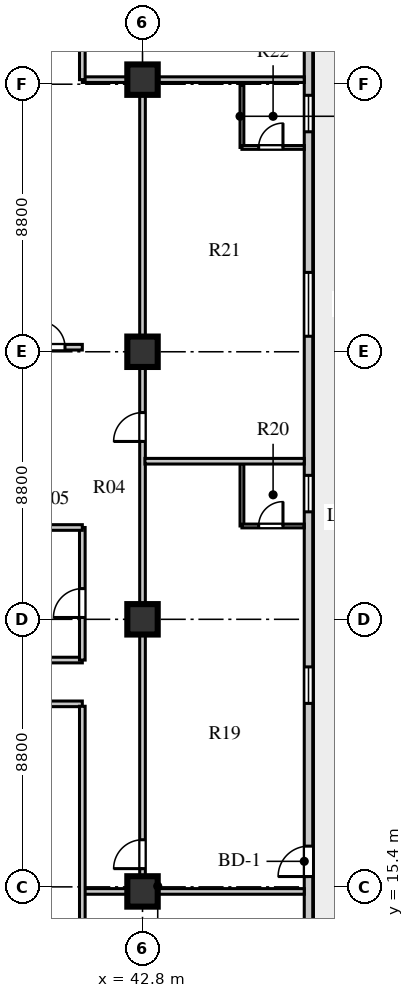
"""IFC4 building model, lengths in metres.
Left out: names, types, materials, properties, quantities, classifications, styles, units other than length and angle.
Written with IfcOpenShell. Run it as: python <this file> out.ifc"""

import sys

from ifc_helpers import new_model, si_unit, direction, frame, frame_2d, origin, origin_2d, place, context, subcontext, project, spatial, rectangle, extrude, element, fill, save


model = new_model("IFC4")
c1 = context("Model", 3, precision=1e-05, world=origin(), true_north=direction((0.0, 1.0)))
c2 = subcontext(c1, "Body", "Model", "MODEL_VIEW")
j1 = project(units=[si_unit("LENGTHUNIT", "METRE"), si_unit("PLANEANGLEUNIT", "RADIAN")], contexts=[c1])
p1 = place(None, origin())
s1 = spatial("IfcSite", under=j1, at=p1, CompositionType="ELEMENT")
p2 = place(p1, origin())
s2 = spatial("IfcBuilding", under=s1, at=p2, CompositionType="ELEMENT")
p3 = place(p2, frame((0.0, 0.0, 150.2)))
s3 = spatial("IfcBuildingStorey", under=s2, at=p3, CompositionType="ELEMENT", Elevation=150.2)
for number, where, z_axis, x_axis in (
    (1, (42.8, 15.25, 0.0), (0.0, 0.0, 1.0), (1.0, 0.0, 0.0)),
    (2, (42.8, 24.2, 0.0), (0.0, 0.0, 1.0), (1.0, 0.0, 0.0)),
    (3, (42.8, 33.0, 0.0), (0.0, 0.0, 1.0), (1.0, 0.0, 0.0)),
    (4, (42.8, 41.95, 0.0), (0.0, 0.0, 1.0), (1.0, 0.0, 0.0)),
):
    element("IfcColumn", number, at=place(p3, frame(where, z_axis=z_axis, x_axis=x_axis)), inside=s3, PredefinedType="COLUMN", context=c2, shape_type="SweptSolid", body=[
        extrude(rectangle(XDim=1.0, YDim=1.0, at=origin_2d()), origin(), (0.0, 0.0, 1.0), 3.55),
    ])
p4 = place(p3, frame((48.26, 13.33, 0.0), z_axis=(0.0, 0.0, 1.0), x_axis=(0.0, 1.0, 0.0)))
e5 = element("IfcWall", 5, at=p4, inside=s3, PredefinedType="STANDARD", context=c2, shape_type="SweptSolid", body=[
    extrude(rectangle(XDim=30.54, YDim=0.28, at=frame_2d((15.27, 0.0))), origin(), (0.0, 0.0, 1.0), 3.55),
])
p5 = place(p4, frame((2.41, 0.0, 0.0)))
e6 = element("IfcOpeningElement", 6, at=p5, cuts=e5, PredefinedType="OPENING", context=c2, shape_type="SweptSolid", body=[
    extrude(rectangle(XDim=1.0, YDim=2.05, at=frame_2d((0.5, 1.025))), frame((0.0, 0.15, 0.0), z_axis=(0.0, -1.0, 0.0), x_axis=(1.0, 0.0, 0.0)), (0.0, 0.0, 1.0), 0.3),
])
p6 = place(p4, frame((8.105, 0.0, 0.8)))
e7 = element("IfcOpeningElement", 7, at=p6, cuts=e5, PredefinedType="OPENING", context=c2, shape_type="SweptSolid", body=[
    extrude(rectangle(XDim=1.2, YDim=1.75, at=frame_2d((0.6, 0.875))), frame((0.0, 0.15, 0.0), z_axis=(0.0, -1.0, 0.0), x_axis=(1.0, 0.0, 0.0)), (0.0, 0.0, 1.0), 0.3),
])
p7 = place(p4, frame((14.405, 0.0, 0.8)))
e8 = element("IfcOpeningElement", 8, at=p7, cuts=e5, PredefinedType="OPENING", context=c2, shape_type="SweptSolid", body=[
    extrude(rectangle(XDim=1.2, YDim=1.75, at=frame_2d((0.6, 0.875))), frame((0.0, 0.15, 0.0), z_axis=(0.0, -1.0, 0.0), x_axis=(1.0, 0.0, 0.0)), (0.0, 0.0, 1.0), 0.3),
])
p8 = place(p4, frame((20.18, 0.0, 0.8)))
e9 = element("IfcOpeningElement", 9, at=p8, cuts=e5, PredefinedType="OPENING", context=c2, shape_type="SweptSolid", body=[
    extrude(rectangle(XDim=2.1, YDim=1.95, at=frame_2d((1.05, 0.975))), frame((0.0, 0.15, 0.0), z_axis=(0.0, -1.0, 0.0), x_axis=(1.0, 0.0, 0.0)), (0.0, 0.0, 1.0), 0.3),
])
p9 = place(p4, frame((26.905, 0.0, 0.8)))
e10 = element("IfcOpeningElement", 10, at=p9, cuts=e5, PredefinedType="OPENING", context=c2, shape_type="SweptSolid", body=[
    extrude(rectangle(XDim=1.2, YDim=1.75, at=frame_2d((0.6, 0.875))), frame((0.0, 0.15, 0.0), z_axis=(0.0, -1.0, 0.0), x_axis=(1.0, 0.0, 0.0)), (0.0, 0.0, 1.0), 0.3),
])
p10 = place(p3, frame((25.22, 21.42, 0.0), z_axis=(0.0, 0.0, 1.0), x_axis=(1.0, 0.0, 0.0)))
e11 = element("IfcWall", 11, at=p10, inside=s3, PredefinedType="SOLIDWALL", context=c2, shape_type="SweptSolid", body=[
    extrude(rectangle(XDim=15.6, YDim=0.185, at=frame_2d((7.8, 0.0))), origin(), (0.0, 0.0, 1.0), 3.15),
])
p11 = place(p10, frame((0.73, 0.0, 0.0)))
e12 = element("IfcOpeningElement", 12, at=p11, cuts=e11, PredefinedType="OPENING", context=c2, shape_type="SweptSolid", body=[
    extrude(rectangle(XDim=0.95, YDim=2.1, at=frame_2d((0.475, 1.05))), frame((0.0, 0.103, 0.0), z_axis=(0.0, -1.0, 0.0), x_axis=(1.0, 0.0, 0.0)), (0.0, 0.0, 1.0), 0.205),
])
p12 = place(p3, frame((27.15, 22.86, 0.0), z_axis=(0.0, 0.0, 1.0), x_axis=(1.0, 0.0, 0.0)))
e13 = element("IfcWall", 13, at=p12, inside=s3, PredefinedType="SOLIDWALL", context=c2, shape_type="SweptSolid", body=[
    extrude(rectangle(XDim=13.67, YDim=0.185, at=frame_2d((6.835, 0.0))), origin(), (0.0, 0.0, 1.0), 3.55),
])
p13 = place(p12, frame((2.2, 0.0, 0.0)))
e14 = element("IfcOpeningElement", 14, at=p13, cuts=e13, PredefinedType="OPENING", context=c2, shape_type="SweptSolid", body=[
    extrude(rectangle(XDim=0.9, YDim=2.08, at=frame_2d((0.45, 1.04))), frame((0.0, 0.103, 0.0), z_axis=(0.0, -1.0, 0.0), x_axis=(1.0, 0.0, 0.0)), (0.0, 0.0, 1.0), 0.205),
])
p14 = place(p3, frame((42.8, 15.25, 0.0), z_axis=(0.0, 0.0, 1.0), x_axis=(0.0, 1.0, 0.0)))
e15 = element("IfcWall", 15, at=p14, inside=s3, PredefinedType="SOLIDWALL", context=c2, shape_type="SweptSolid", body=[
    extrude(rectangle(XDim=26.7, YDim=0.185, at=frame_2d((13.35, 0.0))), origin(), (0.0, 0.0, 1.0), 2.9),
])
p15 = place(p14, frame((0.75, 0.0, 0.0)))
e16 = element("IfcOpeningElement", 16, at=p15, cuts=e15, PredefinedType="OPENING", context=c2, shape_type="SweptSolid", body=[
    extrude(rectangle(XDim=0.95, YDim=2.1, at=frame_2d((0.475, 1.05))), frame((0.0, 0.103, 0.0), z_axis=(0.0, -1.0, 0.0), x_axis=(1.0, 0.0, 0.0)), (0.0, 0.0, 1.0), 0.205),
])
p16 = place(p14, frame((14.8, 0.0, 0.0)))
e17 = element("IfcOpeningElement", 17, at=p16, cuts=e15, PredefinedType="OPENING", context=c2, shape_type="SweptSolid", body=[
    extrude(rectangle(XDim=0.95, YDim=2.1, at=frame_2d((0.475, 1.05))), frame((0.0, 0.103, 0.0), z_axis=(0.0, -1.0, 0.0), x_axis=(1.0, 0.0, 0.0)), (0.0, 0.0, 1.0), 0.205),
])
for number, where, z_axis, x_axis in (
    (18, (40.82, 15.25, 0.0), (0.0, 0.0, 1.0), (1.0, 0.0, 0.0)),
    (19, (40.82, 41.95, 0.0), (0.0, 0.0, 1.0), (1.0, 0.0, 0.0)),
):
    element("IfcWall", number, at=place(p3, frame(where, z_axis=z_axis, x_axis=x_axis)), inside=s3, PredefinedType="SOLIDWALL", context=c2, shape_type="SweptSolid", body=[
        extrude(rectangle(XDim=7.3, YDim=0.185, at=frame_2d((3.65, 0.0))), origin(), (0.0, 0.0, 1.0), 2.9),
    ])
p17 = place(p3, frame((40.82, 22.86, 0.0), z_axis=(0.0, 0.0, 1.0), x_axis=(0.0, 1.0, 0.0)))
e20 = element("IfcWall", 20, at=p17, inside=s3, PredefinedType="SOLIDWALL", context=c2, shape_type="SweptSolid", body=[
    extrude(rectangle(XDim=4.36, YDim=0.185, at=frame_2d((2.18, 0.0))), origin(), (0.0, 0.0, 1.0), 3.55),
])
p18 = place(p17, frame((1.4, 0.0, 0.0)))
e21 = element("IfcOpeningElement", 21, at=p18, cuts=e20, PredefinedType="OPENING", context=c2, shape_type="SweptSolid", body=[
    extrude(rectangle(XDim=0.95, YDim=2.1, at=frame_2d((0.475, 1.05))), frame((0.0, 0.103, 0.0), z_axis=(0.0, -1.0, 0.0), x_axis=(1.0, 0.0, 0.0)), (0.0, 0.0, 1.0), 0.205),
])
p19 = place(p3, frame((36.9, 27.22, 0.0), z_axis=(0.0, 0.0, 1.0), x_axis=(1.0, 0.0, 0.0)))
e22 = element("IfcWall", 22, at=p19, inside=s3, PredefinedType="SOLIDWALL", context=c2, shape_type="SweptSolid", body=[
    extrude(rectangle(XDim=3.92, YDim=0.185, at=frame_2d((1.96, 0.0))), origin(), (0.0, 0.0, 1.0), 3.15),
])
p20 = place(p3, frame((40.82, 10.28, 0.0), z_axis=(0.0, 0.0, 1.0), x_axis=(0.0, 1.0, 0.0)))
e23 = element("IfcWall", 23, at=p20, inside=s3, PredefinedType="SOLIDWALL", context=c2, shape_type="SweptSolid", body=[
    extrude(rectangle(XDim=11.06, YDim=0.185, at=frame_2d((5.53, 0.0))), origin(), (0.0, 0.0, 1.0), 3.55),
])
p21 = place(p3, frame((46.07, 27.27, 0.0), z_axis=(0.0, 0.0, 1.0), x_axis=(0.0, 1.0, 0.0)))
e24 = element("IfcWall", 24, at=p21, inside=s3, PredefinedType="PLUMBINGWALL", context=c2, shape_type="SweptSolid", body=[
    extrude(rectangle(XDim=2.05, YDim=0.125, at=frame_2d((1.025, 0.0))), origin(), (0.0, 0.0, 1.0), 3.55),
])
p22 = place(p3, frame((46.07, 27.27, 0.0), z_axis=(0.0, 0.0, 1.0), x_axis=(1.0, 0.0, 0.0)))
e25 = element("IfcWall", 25, at=p22, inside=s3, PredefinedType="PLUMBINGWALL", context=c2, shape_type="SweptSolid", body=[
    extrude(rectangle(XDim=2.05, YDim=0.125, at=frame_2d((1.025, 0.0))), origin(), (0.0, 0.0, 1.0), 3.55),
])
p23 = place(p22, frame((0.55, 0.0, 0.0)))
e26 = element("IfcOpeningElement", 26, at=p23, cuts=e25, PredefinedType="OPENING", context=c2, shape_type="SweptSolid", body=[
    extrude(rectangle(XDim=0.8, YDim=2.05, at=frame_2d((0.4, 1.025))), frame((0.0, 0.073, 0.0), z_axis=(0.0, -1.0, 0.0), x_axis=(1.0, 0.0, 0.0)), (0.0, 0.0, 1.0), 0.145),
])
p24 = place(p3, frame((42.88, 29.4, 0.0), z_axis=(0.0, 0.0, 1.0), x_axis=(1.0, 0.0, 0.0)))
e27 = element("IfcWall", 27, at=p24, inside=s3, PredefinedType="SOLIDWALL", context=c2, shape_type="SweptSolid", body=[
    extrude(rectangle(XDim=5.24, YDim=0.185, at=frame_2d((2.62, 0.0))), origin(), (0.0, 0.0, 1.0), 3.55),
])
p25 = place(p3, frame((46.07, 39.72, 0.0), z_axis=(0.0, 0.0, 1.0), x_axis=(0.0, 1.0, 0.0)))
e28 = element("IfcWall", 28, at=p25, inside=s3, PredefinedType="PLUMBINGWALL", context=c2, shape_type="SweptSolid", body=[
    extrude(rectangle(XDim=2.05, YDim=0.125, at=frame_2d((1.025, 0.0))), origin(), (0.0, 0.0, 1.0), 3.55),
])
p26 = place(p3, frame((46.07, 39.72, 0.0), z_axis=(0.0, 0.0, 1.0), x_axis=(1.0, 0.0, 0.0)))
e29 = element("IfcWall", 29, at=p26, inside=s3, PredefinedType="PLUMBINGWALL", context=c2, shape_type="SweptSolid", body=[
    extrude(rectangle(XDim=2.05, YDim=0.125, at=frame_2d((1.025, 0.0))), origin(), (0.0, 0.0, 1.0), 3.55),
])
p27 = place(p26, frame((0.55, 0.0, 0.0)))
e30 = element("IfcOpeningElement", 30, at=p27, cuts=e29, PredefinedType="OPENING", context=c2, shape_type="SweptSolid", body=[
    extrude(rectangle(XDim=0.8, YDim=2.05, at=frame_2d((0.4, 1.025))), frame((0.0, 0.073, 0.0), z_axis=(0.0, -1.0, 0.0), x_axis=(1.0, 0.0, 0.0)), (0.0, 0.0, 1.0), 0.145),
])
p28 = place(p3, frame((38.95, 33.15, 0.0), z_axis=(0.0, 0.0, 1.0), x_axis=(1.0, 0.0, 0.0)))
e31 = element("IfcWall", 31, at=p28, inside=s3, PredefinedType="SOLIDWALL", context=c2, shape_type="SweptSolid", body=[
    extrude(rectangle(XDim=1.87, YDim=0.185, at=frame_2d((0.935, 0.0))), origin(), (0.0, 0.0, 1.0), 3.55),
])
p29 = place(p28, frame((0.45, 0.0, 0.0)))
e32 = element("IfcOpeningElement", 32, at=p29, cuts=e31, PredefinedType="OPENING", context=c2, shape_type="SweptSolid", body=[
    extrude(rectangle(XDim=0.85, YDim=2.05, at=frame_2d((0.425, 1.025))), frame((0.0, 0.103, 0.0), z_axis=(0.0, -1.0, 0.0), x_axis=(1.0, 0.0, 0.0)), (0.0, 0.0, 1.0), 0.205),
])
p30 = place(p3, frame((40.82, 41.95, 0.0), z_axis=(0.0, 0.0, 1.0), x_axis=(0.0, 1.0, 0.0)))
e33 = element("IfcWall", 33, at=p30, inside=s3, PredefinedType="SOLIDWALL", context=c2, shape_type="SweptSolid", body=[
    extrude(rectangle(XDim=4.97, YDim=0.185, at=frame_2d((2.485, 0.0))), origin(), (0.0, 0.0, 1.0), 3.55),
])
p31 = place(p5, frame((1.0, 0.0, 0.0), z_axis=(0.0, 0.0, 1.0), x_axis=(-1.0, 0.0, 0.0)))
e34 = element("IfcDoor", 34, at=p31, inside=s3, OperationType="SINGLE_SWING_RIGHT", PredefinedType="DOOR", context=c2, shape_type="SweptSolid", body=[
    extrude(rectangle(XDim=1.0, YDim=2.05, at=frame_2d((0.5, 1.025))), frame((0.0, 0.025, 0.0), z_axis=(0.0, -1.0, 0.0), x_axis=(1.0, 0.0, 0.0)), (0.0, 0.0, 1.0), 0.05),
])
fill(e6, e34)
p32 = place(p6, origin())
e35 = element("IfcWindow", 35, at=p32, inside=s3, PartitioningType="SINGLE_PANEL", PredefinedType="WINDOW", context=c2, shape_type="SweptSolid", body=[
    extrude(rectangle(XDim=1.2, YDim=1.75, at=frame_2d((0.6, 0.875))), frame((0.0, 0.03, 0.0), z_axis=(0.0, -1.0, 0.0), x_axis=(1.0, 0.0, 0.0)), (0.0, 0.0, 1.0), 0.06),
])
fill(e7, e35)
p33 = place(p7, origin())
e36 = element("IfcWindow", 36, at=p33, inside=s3, PartitioningType="SINGLE_PANEL", PredefinedType="WINDOW", context=c2, shape_type="SweptSolid", body=[
    extrude(rectangle(XDim=1.2, YDim=1.75, at=frame_2d((0.6, 0.875))), frame((0.0, 0.03, 0.0), z_axis=(0.0, -1.0, 0.0), x_axis=(1.0, 0.0, 0.0)), (0.0, 0.0, 1.0), 0.06),
])
fill(e8, e36)
p34 = place(p8, origin())
e37 = element("IfcWindow", 37, at=p34, inside=s3, PartitioningType="SINGLE_PANEL", PredefinedType="WINDOW", context=c2, shape_type="SweptSolid", body=[
    extrude(rectangle(XDim=2.1, YDim=1.95, at=frame_2d((1.05, 0.975))), frame((0.0, 0.03, 0.0), z_axis=(0.0, -1.0, 0.0), x_axis=(1.0, 0.0, 0.0)), (0.0, 0.0, 1.0), 0.06),
])
fill(e9, e37)
p35 = place(p9, origin())
e38 = element("IfcWindow", 38, at=p35, inside=s3, PartitioningType="SINGLE_PANEL", PredefinedType="WINDOW", context=c2, shape_type="SweptSolid", body=[
    extrude(rectangle(XDim=1.2, YDim=1.75, at=frame_2d((0.6, 0.875))), frame((0.0, 0.03, 0.0), z_axis=(0.0, -1.0, 0.0), x_axis=(1.0, 0.0, 0.0)), (0.0, 0.0, 1.0), 0.06),
])
fill(e10, e38)
p36 = place(p18, frame((0.95, 0.0, 0.0), z_axis=(0.0, 0.0, 1.0), x_axis=(-1.0, 0.0, 0.0)))
e39 = element("IfcDoor", 39, at=p36, inside=s3, OperationType="SINGLE_SWING_RIGHT", PredefinedType="DOOR", context=c2, shape_type="SweptSolid", body=[
    extrude(rectangle(XDim=0.95, YDim=2.1, at=frame_2d((0.475, 1.05))), frame((0.0, 0.025, 0.0), z_axis=(0.0, -1.0, 0.0), x_axis=(1.0, 0.0, 0.0)), (0.0, 0.0, 1.0), 0.05),
])
fill(e21, e39)
p37 = place(p15, origin())
e40 = element("IfcDoor", 40, at=p37, inside=s3, OperationType="SINGLE_SWING_LEFT", PredefinedType="DOOR", context=c2, shape_type="SweptSolid", body=[
    extrude(rectangle(XDim=0.95, YDim=2.1, at=frame_2d((0.475, 1.05))), frame((0.0, 0.025, 0.0), z_axis=(0.0, -1.0, 0.0), x_axis=(1.0, 0.0, 0.0)), (0.0, 0.0, 1.0), 0.05),
])
fill(e16, e40)
p38 = place(p23, frame((0.8, 0.0, 0.0), z_axis=(0.0, 0.0, 1.0), x_axis=(-1.0, 0.0, 0.0)))
e41 = element("IfcDoor", 41, at=p38, inside=s3, OperationType="SINGLE_SWING_LEFT", PredefinedType="DOOR", context=c2, shape_type="SweptSolid", body=[
    extrude(rectangle(XDim=0.8, YDim=2.05, at=frame_2d((0.4, 1.025))), frame((0.0, 0.025, 0.0), z_axis=(0.0, -1.0, 0.0), x_axis=(1.0, 0.0, 0.0)), (0.0, 0.0, 1.0), 0.05),
])
fill(e26, e41)
p39 = place(p16, origin())
e42 = element("IfcDoor", 42, at=p39, inside=s3, OperationType="SINGLE_SWING_LEFT", PredefinedType="DOOR", context=c2, shape_type="SweptSolid", body=[
    extrude(rectangle(XDim=0.95, YDim=2.1, at=frame_2d((0.475, 1.05))), frame((0.0, 0.025, 0.0), z_axis=(0.0, -1.0, 0.0), x_axis=(1.0, 0.0, 0.0)), (0.0, 0.0, 1.0), 0.05),
])
fill(e17, e42)
p40 = place(p27, frame((0.8, 0.0, 0.0), z_axis=(0.0, 0.0, 1.0), x_axis=(-1.0, 0.0, 0.0)))
e43 = element("IfcDoor", 43, at=p40, inside=s3, OperationType="SINGLE_SWING_LEFT", PredefinedType="DOOR", context=c2, shape_type="SweptSolid", body=[
    extrude(rectangle(XDim=0.8, YDim=2.05, at=frame_2d((0.4, 1.025))), frame((0.0, 0.025, 0.0), z_axis=(0.0, -1.0, 0.0), x_axis=(1.0, 0.0, 0.0)), (0.0, 0.0, 1.0), 0.05),
])
fill(e30, e43)
p41 = place(p29, origin())
e44 = element("IfcDoor", 44, at=p41, inside=s3, OperationType="SINGLE_SWING_LEFT", PredefinedType="DOOR", context=c2, shape_type="SweptSolid", body=[
    extrude(rectangle(XDim=0.85, YDim=2.05, at=frame_2d((0.425, 1.025))), frame((0.0, 0.025, 0.0), z_axis=(0.0, -1.0, 0.0), x_axis=(1.0, 0.0, 0.0)), (0.0, 0.0, 1.0), 0.05),
])
fill(e32, e44)
save(model, sys.argv[1])
